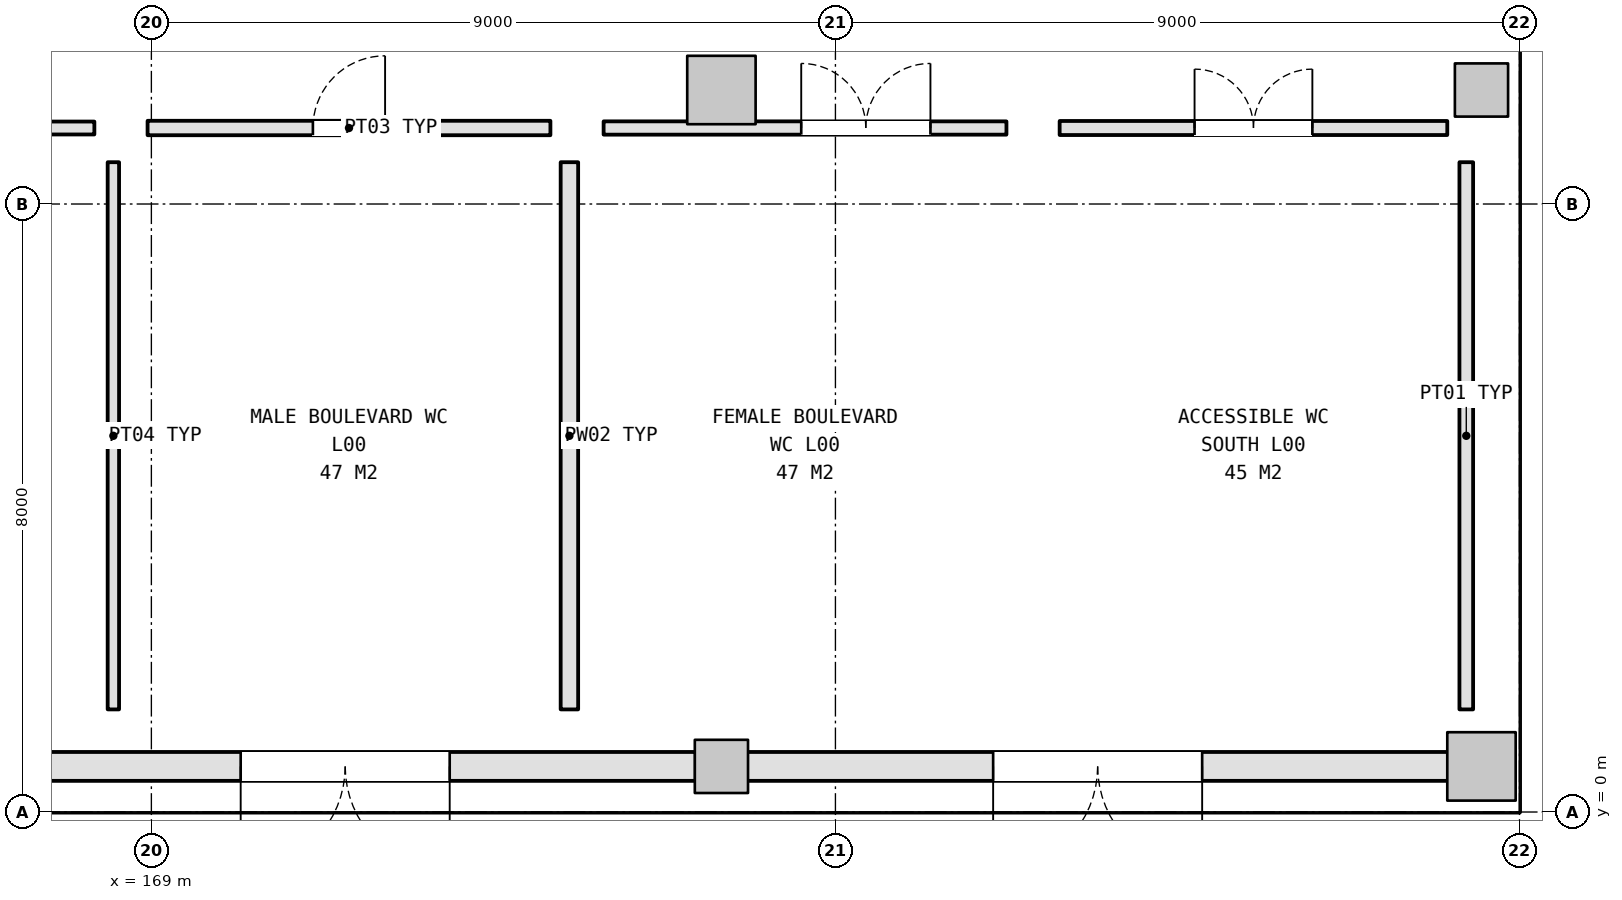
"""IFC4 building model, lengths in metres.
Left out: names, types, materials, properties, quantities, classifications, styles, units other than length and angle.
Written with IfcOpenShell. Run it as: python <this file> out.ifc"""

import sys

from ifc_helpers import new_model, si_unit, direction, frame, frame_2d, origin, origin_2d, place, context, subcontext, project, spatial, rectangle, extrude, element, fill, save


model = new_model("IFC4")
c1 = context("Model", 3, precision=1e-05, world=origin(), true_north=direction((0.0, 1.0)))
c2 = subcontext(c1, "Body", "Model", "MODEL_VIEW")
j1 = project(units=[si_unit("LENGTHUNIT", "METRE"), si_unit("PLANEANGLEUNIT", "RADIAN")], contexts=[c1])
p1 = place(None, origin())
s1 = spatial("IfcSite", under=j1, at=p1, CompositionType="ELEMENT")
p2 = place(p1, origin())
s2 = spatial("IfcBuilding", under=s1, at=p2, CompositionType="ELEMENT")
p3 = place(p2, origin())
s3 = spatial("IfcBuildingStorey", under=s2, at=p3, CompositionType="ELEMENT", Elevation=0.0)
p4 = place(p3, frame((176.5, 0.6, 0.0), z_axis=(0.0, 0.0, 1.0), x_axis=(1.0, 0.0, 0.0)))
e1 = element("IfcColumn", 1, at=p4, inside=s3, PredefinedType="COLUMN", context=c2, shape_type="SweptSolid", body=[
    extrude(rectangle(XDim=0.7, YDim=0.7, at=origin_2d()), origin(), (0.0, 0.0, 1.0), 5.4),
])
for number, where, z_axis, x_axis in (
    (2, (176.5, 9.5, 0.0), (0.0, 0.0, 1.0), (1.0, 0.0, 0.0)),
    (3, (186.5, 0.6, 0.0), (0.0, 0.0, 1.0), (1.0, 0.0, 0.0)),
):
    element("IfcColumn", number, at=place(p3, frame(where, z_axis=z_axis, x_axis=x_axis)), inside=s3, PredefinedType="COLUMN", context=c2, shape_type="SweptSolid", body=[
        extrude(rectangle(XDim=0.9, YDim=0.9, at=origin_2d()), origin(), (0.0, 0.0, 1.0), 5.4),
    ])
p5 = place(p3, frame((186.5, 9.5, 0.0), z_axis=(0.0, 0.0, 1.0), x_axis=(1.0, 0.0, 0.0)))
e4 = element("IfcColumn", 4, at=p5, inside=s3, PredefinedType="COLUMN", context=c2, shape_type="SweptSolid", body=[
    extrude(rectangle(XDim=0.7, YDim=0.7, at=origin_2d()), origin(), (0.0, 0.0, 1.0), 5.4),
])
p6 = place(p3, frame((166.938, 0.6, 0.0), z_axis=(0.0, 0.0, 1.0), x_axis=(1.0, 0.0, 0.0)))
e5 = element("IfcWall", 5, at=p6, inside=s3, PredefinedType="SOLIDWALL", context=c2, shape_type="SweptSolid", body=[
    extrude(rectangle(XDim=9.224, YDim=0.38, at=frame_2d((4.612, 0.0))), origin(), (0.0, 0.0, 1.0), 4.425),
])
p7 = place(p6, frame((3.237, 0.0, 0.0)))
e6 = element("IfcOpeningElement", 6, at=p7, cuts=e5, PredefinedType="OPENING", context=c2, shape_type="SweptSolid", body=[
    extrude(rectangle(XDim=2.75, YDim=2.4, at=frame_2d((1.375, 1.2))), frame((0.0, 0.2, 0.0), z_axis=(0.0, -1.0, 0.0), x_axis=(1.0, 0.0, 0.0)), (0.0, 0.0, 1.0), 0.4),
])
p8 = place(p3, frame((176.838, 0.6, 0.0), z_axis=(0.0, 0.0, 1.0), x_axis=(1.0, 0.0, 0.0)))
e7 = element("IfcWall", 7, at=p8, inside=s3, PredefinedType="SOLIDWALL", context=c2, shape_type="SweptSolid", body=[
    extrude(rectangle(XDim=9.224, YDim=0.38, at=frame_2d((4.612, 0.0))), origin(), (0.0, 0.0, 1.0), 4.425),
])
p9 = place(p8, frame((3.237, 0.0, 0.0)))
e8 = element("IfcOpeningElement", 8, at=p9, cuts=e7, PredefinedType="OPENING", context=c2, shape_type="SweptSolid", body=[
    extrude(rectangle(XDim=2.75, YDim=2.4, at=frame_2d((1.375, 1.2))), frame((0.0, 0.2, 0.0), z_axis=(0.0, -1.0, 0.0), x_axis=(1.0, 0.0, 0.0)), (0.0, 0.0, 1.0), 0.4),
])
p10 = place(p3, frame((148.95, 9.0, 0.0), z_axis=(0.0, 0.0, 1.0), x_axis=(1.0, 0.0, 0.0)))
e9 = element("IfcWall", 9, at=p10, inside=s3, PredefinedType="PARTITIONING", context=c2, shape_type="SweptSolid", body=[
    extrude(rectangle(XDim=19.3, YDim=0.17, at=frame_2d((9.65, 0.0))), origin(), (0.0, 0.0, 1.0), 4.425),
])
p11 = place(p10, frame((9.17, 0.0, 0.0)))
e10 = element("IfcOpeningElement", 10, at=p11, cuts=e9, PredefinedType="OPENING", context=c2, shape_type="SweptSolid", body=[
    extrude(rectangle(XDim=0.96, YDim=2.15, at=frame_2d((0.48, 1.075))), frame((0.0, 0.095, 0.0), z_axis=(0.0, -1.0, 0.0), x_axis=(1.0, 0.0, 0.0)), (0.0, 0.0, 1.0), 0.19),
])
p12 = place(p3, frame((168.5, 8.55, 0.0), z_axis=(0.0, 0.0, 1.0), x_axis=(0.0, -1.0, 0.0)))
e11 = element("IfcWall", 11, at=p12, inside=s3, PredefinedType="PARTITIONING", context=c2, shape_type="SweptSolid", body=[
    extrude(rectangle(XDim=7.2, YDim=0.15, at=frame_2d((3.6, 0.0))), origin(), (0.0, 0.0, 1.0), 4.625),
])
p13 = place(p3, frame((168.95, 9.0, 0.0), z_axis=(0.0, 0.0, 1.0), x_axis=(1.0, 0.0, 0.0)))
e12 = element("IfcWall", 12, at=p13, inside=s3, PredefinedType="PARTITIONING", context=c2, shape_type="SweptSolid", body=[
    extrude(rectangle(XDim=5.3, YDim=0.19, at=frame_2d((2.65, 0.0))), origin(), (0.0, 0.0, 1.0), 5.12),
])
p14 = place(p13, frame((2.175, 0.0, 0.0)))
e13 = element("IfcOpeningElement", 13, at=p14, cuts=e12, PredefinedType="OPENING", context=c2, shape_type="SweptSolid", body=[
    extrude(rectangle(XDim=0.95, YDim=2.15, at=frame_2d((0.475, 1.075))), frame((0.0, 0.105, 0.0), z_axis=(0.0, -1.0, 0.0), x_axis=(1.0, 0.0, 0.0)), (0.0, 0.0, 1.0), 0.21),
])
p15 = place(p3, frame((174.5, 8.55, 0.0), z_axis=(0.0, 0.0, 1.0), x_axis=(0.0, -1.0, 0.0)))
e14 = element("IfcWall", 14, at=p15, inside=s3, PredefinedType="PLUMBINGWALL", context=c2, shape_type="SweptSolid", body=[
    extrude(rectangle(XDim=7.2, YDim=0.23, at=frame_2d((3.6, 0.0))), origin(), (0.0, 0.0, 1.0), 4.625),
])
p16 = place(p3, frame((174.95, 9.0, 0.0), z_axis=(0.0, 0.0, 1.0), x_axis=(1.0, 0.0, 0.0)))
e15 = element("IfcWall", 15, at=p16, inside=s3, PredefinedType="PARTITIONING", context=c2, shape_type="SweptSolid", body=[
    extrude(rectangle(XDim=5.3, YDim=0.175, at=frame_2d((2.65, 0.0))), origin(), (0.0, 0.0, 1.0), 4.425),
])
p17 = place(p16, frame((2.6, 0.0, 0.0)))
e16 = element("IfcOpeningElement", 16, at=p17, cuts=e15, PredefinedType="OPENING", context=c2, shape_type="SweptSolid", body=[
    extrude(rectangle(XDim=1.7, YDim=2.25, at=frame_2d((0.85, 1.125))), frame((0.0, 0.097, 0.0), z_axis=(0.0, -1.0, 0.0), x_axis=(1.0, 0.0, 0.0)), (0.0, 0.0, 1.0), 0.195),
])
p18 = place(p3, frame((180.95, 9.0, 0.0), z_axis=(0.0, 0.0, 1.0), x_axis=(1.0, 0.0, 0.0)))
e17 = element("IfcWall", 17, at=p18, inside=s3, PredefinedType="PARTITIONING", context=c2, shape_type="SweptSolid", body=[
    extrude(rectangle(XDim=5.1, YDim=0.185, at=frame_2d((2.55, 0.0))), origin(), (0.0, 0.0, 1.0), 5.12),
])
p19 = place(p18, frame((1.775, 0.0, 0.0)))
e18 = element("IfcOpeningElement", 18, at=p19, cuts=e17, PredefinedType="OPENING", context=c2, shape_type="SweptSolid", body=[
    extrude(rectangle(XDim=1.55, YDim=2.15, at=frame_2d((0.775, 1.075))), frame((0.0, 0.103, 0.0), z_axis=(0.0, -1.0, 0.0), x_axis=(1.0, 0.0, 0.0)), (0.0, 0.0, 1.0), 0.205),
])
p20 = place(p3, frame((186.3, 8.55, 0.0), z_axis=(0.0, 0.0, 1.0), x_axis=(0.0, -1.0, 0.0)))
e19 = element("IfcWall", 19, at=p20, inside=s3, PredefinedType="PARTITIONING", context=c2, shape_type="SweptSolid", body=[
    extrude(rectangle(XDim=7.2, YDim=0.18, at=frame_2d((3.6, 0.0))), origin(), (0.0, 0.0, 1.0), 4.475),
])
p21 = place(p7, frame((2.75, 0.0, 0.0), z_axis=(0.0, 0.0, 1.0), x_axis=(-1.0, 0.0, 0.0)))
e20 = element("IfcDoor", 20, at=p21, inside=s3, OperationType="DOUBLE_DOOR_SINGLE_SWING", PredefinedType="DOOR", context=c2, shape_type="SweptSolid", body=[
    extrude(rectangle(XDim=2.75, YDim=2.4, at=frame_2d((1.375, 1.2))), frame((0.0, 0.025, 0.0), z_axis=(0.0, -1.0, 0.0), x_axis=(1.0, 0.0, 0.0)), (0.0, 0.0, 1.0), 0.05),
])
fill(e6, e20)
p22 = place(p9, frame((2.75, 0.0, 0.0), z_axis=(0.0, 0.0, 1.0), x_axis=(-1.0, 0.0, 0.0)))
e21 = element("IfcDoor", 21, at=p22, inside=s3, OperationType="DOUBLE_DOOR_SINGLE_SWING", PredefinedType="DOOR", context=c2, shape_type="SweptSolid", body=[
    extrude(rectangle(XDim=2.75, YDim=2.4, at=frame_2d((1.375, 1.2))), frame((0.0, 0.025, 0.0), z_axis=(0.0, -1.0, 0.0), x_axis=(1.0, 0.0, 0.0)), (0.0, 0.0, 1.0), 0.05),
])
fill(e8, e21)
p23 = place(p14, origin())
e22 = element("IfcDoor", 22, at=p23, inside=s3, OperationType="SINGLE_SWING_RIGHT", PredefinedType="DOOR", context=c2, shape_type="SweptSolid", body=[
    extrude(rectangle(XDim=0.95, YDim=2.15, at=frame_2d((0.475, 1.075))), frame((0.0, 0.025, 0.0), z_axis=(0.0, -1.0, 0.0), x_axis=(1.0, 0.0, 0.0)), (0.0, 0.0, 1.0), 0.05),
])
fill(e13, e22)
p24 = place(p17, origin())
e23 = element("IfcDoor", 23, at=p24, inside=s3, OperationType="DOUBLE_DOOR_SINGLE_SWING", PredefinedType="DOOR", context=c2, shape_type="SweptSolid", body=[
    extrude(rectangle(XDim=1.7, YDim=2.25, at=frame_2d((0.85, 1.125))), frame((0.0, 0.025, 0.0), z_axis=(0.0, -1.0, 0.0), x_axis=(1.0, 0.0, 0.0)), (0.0, 0.0, 1.0), 0.05),
])
fill(e16, e23)
p25 = place(p19, origin())
e24 = element("IfcDoor", 24, at=p25, inside=s3, OperationType="DOUBLE_DOOR_SINGLE_SWING", PredefinedType="DOOR", context=c2, shape_type="SweptSolid", body=[
    extrude(rectangle(XDim=1.55, YDim=2.15, at=frame_2d((0.775, 1.075))), frame((0.0, 0.025, 0.0), z_axis=(0.0, -1.0, 0.0), x_axis=(1.0, 0.0, 0.0)), (0.0, 0.0, 1.0), 0.05),
])
fill(e18, e24)
save(model, sys.argv[1])
